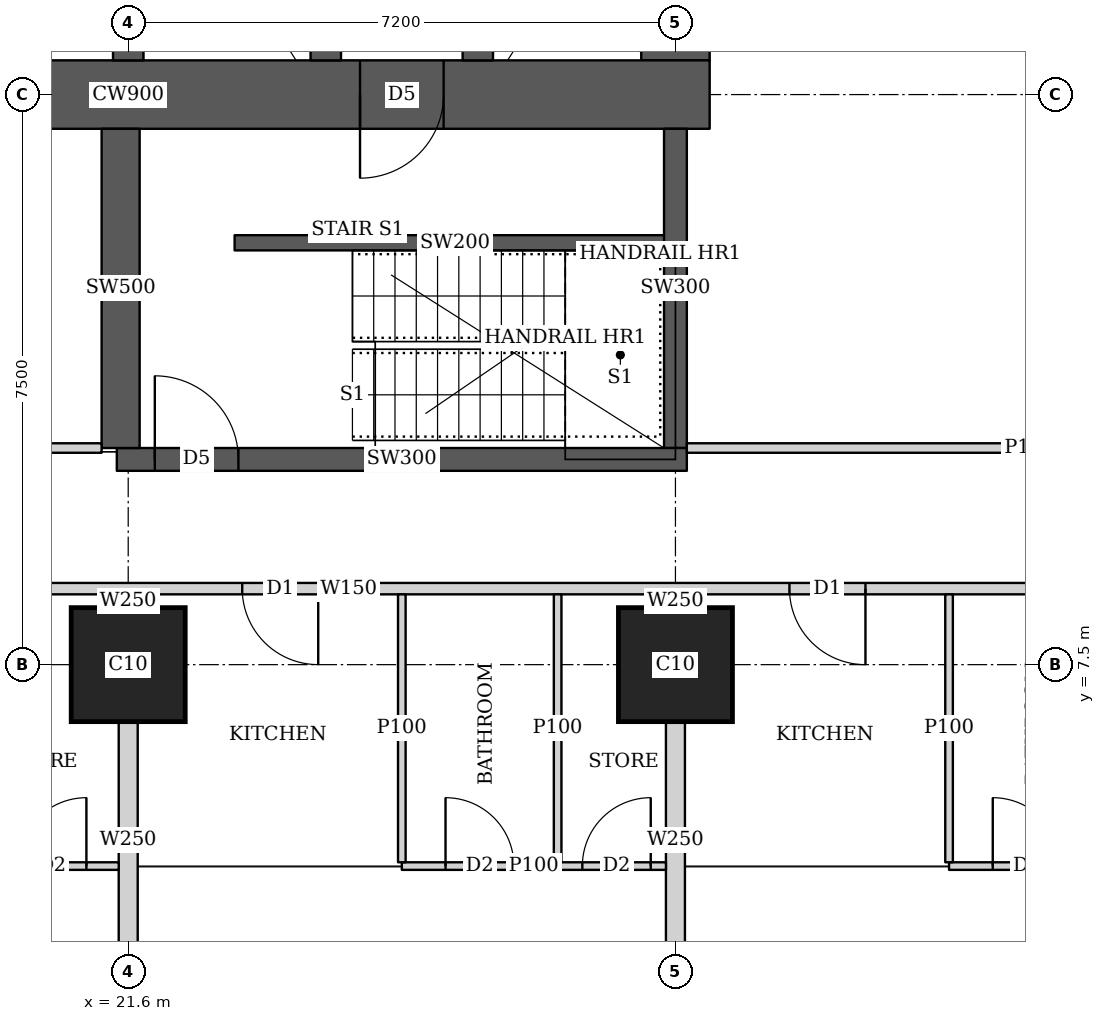
"""IFC4 building model, lengths in metres.
Left out: names, types, materials, properties, quantities, classifications, styles, units other than length and angle.
Written with IfcOpenShell. Run it as: python <this file> out.ifc"""

import sys

from ifc_helpers import new_model, si_unit, direction, frame, frame_2d, origin, origin_2d, place, context, subcontext, project, spatial, rectangle, extrude, element, fill, save


model = new_model("IFC4")
c1 = context("Model", 3, precision=1e-05, world=origin(), true_north=direction((0.0, 1.0)))
c2 = subcontext(c1, "Body", "Model", "MODEL_VIEW")
j1 = project(units=[si_unit("LENGTHUNIT", "METRE"), si_unit("PLANEANGLEUNIT", "RADIAN")], contexts=[c1])
p1 = place(None, origin())
s1 = spatial("IfcSite", under=j1, at=p1, CompositionType="ELEMENT")
p2 = place(p1, origin())
s2 = spatial("IfcBuilding", under=s1, at=p2, CompositionType="ELEMENT")
p3 = place(p2, frame((0.0, 0.0, 184.55)))
s3 = spatial("IfcBuildingStorey", under=s2, at=p3, CompositionType="ELEMENT", Elevation=184.55)
for number, where, z_axis, x_axis in (
    (1, (21.6, 7.5, 0.0), (0.0, 0.0, 1.0), (1.0, 0.0, 0.0)),
    (2, (28.8, 7.5, 0.0), (0.0, 0.0, 1.0), (1.0, 0.0, 0.0)),
):
    element("IfcColumn", number, at=place(p3, frame(where, z_axis=z_axis, x_axis=x_axis)), inside=s3, PredefinedType="COLUMN", context=c2, shape_type="SweptSolid", body=[
        extrude(rectangle(XDim=1.5, YDim=1.5, at=origin_2d()), origin(), (0.0, 0.0, 1.0), 3.75),
    ])
p4 = place(p3, frame((13.95, 15.0, 0.0), z_axis=(0.0, 0.0, 1.0), x_axis=(1.0, 0.0, 0.0)))
e3 = element("IfcWall", 3, at=p4, inside=s3, PredefinedType="SHEAR", context=c2, shape_type="SweptSolid", body=[
    extrude(rectangle(XDim=15.3, YDim=0.9, at=frame_2d((7.65, 0.0))), origin(), (0.0, 0.0, 1.0), 3.75),
])
p5 = place(p4, frame((4.45, 0.0, 0.0)))
e4 = element("IfcOpeningElement", 4, at=p5, cuts=e3, PredefinedType="OPENING", context=c2, shape_type="SweptSolid", body=[
    extrude(rectangle(XDim=1.8, YDim=2.1, at=frame_2d((0.9, 1.05))), frame((0.0, 0.46, 0.0), z_axis=(0.0, -1.0, 0.0), x_axis=(1.0, 0.0, 0.0)), (0.0, 0.0, 1.0), 0.92),
])
p6 = place(p4, frame((10.7, 0.0, 0.0)))
e5 = element("IfcOpeningElement", 5, at=p6, cuts=e3, PredefinedType="OPENING", context=c2, shape_type="SweptSolid", body=[
    extrude(rectangle(XDim=1.1, YDim=2.1, at=frame_2d((0.55, 1.05))), frame((0.0, 0.46, 0.0), z_axis=(0.0, -1.0, 0.0), x_axis=(1.0, 0.0, 0.0)), (0.0, 0.0, 1.0), 0.92),
])
p7 = place(p3, frame((28.8, 15.45, 0.0), z_axis=(0.0, 0.0, 1.0), x_axis=(0.0, 1.0, 0.0)))
e6 = element("IfcWall", 6, at=p7, inside=s3, PredefinedType="SHEAR", context=c2, shape_type="SweptSolid", body=[
    extrude(rectangle(XDim=14.1, YDim=0.9, at=frame_2d((7.05, 0.0))), origin(), (0.0, 0.0, 1.0), 3.75),
])
p8 = place(p3, frame((21.6, 15.45, 0.0), z_axis=(0.0, 0.0, 1.0), x_axis=(0.0, 1.0, 0.0)))
e7 = element("IfcWall", 7, at=p8, inside=s3, PredefinedType="SHEAR", context=c2, shape_type="SweptSolid", body=[
    extrude(rectangle(XDim=14.1, YDim=0.4, at=frame_2d((7.05, 0.0))), origin(), (0.0, 0.0, 1.0), 3.75),
])
p9 = place(p8, frame((0.875, 0.0, 0.0)))
e8 = element("IfcOpeningElement", 8, at=p9, cuts=e7, PredefinedType="OPENING", context=c2, shape_type="SweptSolid", body=[
    extrude(rectangle(XDim=1.1, YDim=2.1, at=frame_2d((0.55, 1.05))), frame((0.0, 0.21, 0.0), z_axis=(0.0, -1.0, 0.0), x_axis=(1.0, 0.0, 0.0)), (0.0, 0.0, 1.0), 0.42),
])
p10 = place(p8, frame((4.625, 0.0, 0.0)))
e9 = element("IfcOpeningElement", 9, at=p10, cuts=e7, PredefinedType="OPENING", context=c2, shape_type="SweptSolid", body=[
    extrude(rectangle(XDim=1.1, YDim=2.1, at=frame_2d((0.55, 1.05))), frame((0.0, 0.21, 0.0), z_axis=(0.0, -1.0, 0.0), x_axis=(1.0, 0.0, 0.0)), (0.0, 0.0, 1.0), 0.42),
])
p11 = place(p8, frame((8.375, 0.0, 0.0)))
e10 = element("IfcOpeningElement", 10, at=p11, cuts=e7, PredefinedType="OPENING", context=c2, shape_type="SweptSolid", body=[
    extrude(rectangle(XDim=1.1, YDim=2.1, at=frame_2d((0.55, 1.05))), frame((0.0, 0.21, 0.0), z_axis=(0.0, -1.0, 0.0), x_axis=(1.0, 0.0, 0.0)), (0.0, 0.0, 1.0), 0.42),
])
p12 = place(p8, frame((12.125, 0.0, 0.0)))
e11 = element("IfcOpeningElement", 11, at=p12, cuts=e7, PredefinedType="OPENING", context=c2, shape_type="SweptSolid", body=[
    extrude(rectangle(XDim=1.1, YDim=2.1, at=frame_2d((0.55, 1.05))), frame((0.0, 0.21, 0.0), z_axis=(0.0, -1.0, 0.0), x_axis=(1.0, 0.0, 0.0)), (0.0, 0.0, 1.0), 0.42),
])
p13 = place(p3, frame((24.2, 15.45, 0.0), z_axis=(0.0, 0.0, 1.0), x_axis=(0.0, 1.0, 0.0)))
e12 = element("IfcWall", 12, at=p13, inside=s3, PredefinedType="SHEAR", context=c2, shape_type="SweptSolid", body=[
    extrude(rectangle(XDim=14.1, YDim=0.4, at=frame_2d((7.05, 0.0))), origin(), (0.0, 0.0, 1.0), 3.75),
])
p14 = place(p3, frame((26.2, 15.45, 0.0), z_axis=(0.0, 0.0, 1.0), x_axis=(0.0, 1.0, 0.0)))
e13 = element("IfcWall", 13, at=p14, inside=s3, PredefinedType="SHEAR", context=c2, shape_type="SweptSolid", body=[
    extrude(rectangle(XDim=3.1, YDim=0.4, at=frame_2d((1.55, 0.0))), origin(), (0.0, 0.0, 1.0), 3.75),
])
p15 = place(p14, frame((0.825, 0.0, 0.0)))
e14 = element("IfcOpeningElement", 14, at=p15, cuts=e13, PredefinedType="OPENING", context=c2, shape_type="SweptSolid", body=[
    extrude(rectangle(XDim=1.2, YDim=2.1, at=frame_2d((0.6, 1.05))), frame((0.0, 0.21, 0.0), z_axis=(0.0, -1.0, 0.0), x_axis=(1.0, 0.0, 0.0)), (0.0, 0.0, 1.0), 0.42),
])
p16 = place(p3, frame((21.45, 10.2, 0.0), z_axis=(0.0, 0.0, 1.0), x_axis=(1.0, 0.0, 0.0)))
e15 = element("IfcWall", 15, at=p16, inside=s3, PredefinedType="SHEAR", context=c2, shape_type="SweptSolid", body=[
    extrude(rectangle(XDim=7.5, YDim=0.3, at=frame_2d((3.75, 0.0))), origin(), (0.0, 0.0, 1.0), 3.75),
])
p17 = place(p16, frame((0.5, 0.0, 0.0)))
e16 = element("IfcOpeningElement", 16, at=p17, cuts=e15, PredefinedType="OPENING", context=c2, shape_type="SweptSolid", body=[
    extrude(rectangle(XDim=1.1, YDim=2.1, at=frame_2d((0.55, 1.05))), frame((0.0, 0.16, 0.0), z_axis=(0.0, -1.0, 0.0), x_axis=(1.0, 0.0, 0.0)), (0.0, 0.0, 1.0), 0.32),
])
p18 = place(p3, frame((21.5, 10.35, 0.0), z_axis=(0.0, 0.0, 1.0), x_axis=(0.0, 1.0, 0.0)))
e17 = element("IfcWall", 17, at=p18, inside=s3, PredefinedType="SHEAR", context=c2, shape_type="SweptSolid", body=[
    extrude(rectangle(XDim=4.2, YDim=0.5, at=frame_2d((2.1, 0.0))), origin(), (0.0, 0.0, 1.0), 3.75),
])
p19 = place(p3, frame((28.8, 10.35, 0.0), z_axis=(0.0, 0.0, 1.0), x_axis=(0.0, 1.0, 0.0)))
e18 = element("IfcWall", 18, at=p19, inside=s3, PredefinedType="SHEAR", context=c2, shape_type="SweptSolid", body=[
    extrude(rectangle(XDim=4.2, YDim=0.3, at=frame_2d((2.1, 0.0))), origin(), (0.0, 0.0, 1.0), 3.75),
])
p20 = place(p3, frame((40.053, 8.5, 0.0), z_axis=(0.0, 0.0, 1.0), x_axis=(-1.0, 0.0, 0.0)))
e19 = element("IfcWall", 19, at=p20, inside=s3, PredefinedType="SOLIDWALL", context=c2, shape_type="SweptSolid", body=[
    extrude(rectangle(XDim=31.703, YDim=0.15, at=frame_2d((15.852, 0.0))), origin(), (0.0, 0.0, 1.0), 3.45),
])
p21 = place(p20, frame((28.103, 0.0, 0.0)))
e20 = element("IfcOpeningElement", 20, at=p21, cuts=e19, PredefinedType="OPENING", context=c2, shape_type="SweptSolid", body=[
    extrude(rectangle(XDim=1.0, YDim=2.1, at=frame_2d((0.5, 1.05))), frame((0.0, 0.085, 0.0), z_axis=(0.0, -1.0, 0.0), x_axis=(1.0, 0.0, 0.0)), (0.0, 0.0, 1.0), 0.17),
])
p22 = place(p20, frame((15.953, 0.0, 0.0)))
e21 = element("IfcOpeningElement", 21, at=p22, cuts=e19, PredefinedType="OPENING", context=c2, shape_type="SweptSolid", body=[
    extrude(rectangle(XDim=1.0, YDim=2.1, at=frame_2d((0.5, 1.05))), frame((0.0, 0.085, 0.0), z_axis=(0.0, -1.0, 0.0), x_axis=(1.0, 0.0, 0.0)), (0.0, 0.0, 1.0), 0.17),
])
p23 = place(p20, frame((8.753, 0.0, 0.0)))
e22 = element("IfcOpeningElement", 22, at=p23, cuts=e19, PredefinedType="OPENING", context=c2, shape_type="SweptSolid", body=[
    extrude(rectangle(XDim=1.0, YDim=2.1, at=frame_2d((0.5, 1.05))), frame((0.0, 0.085, 0.0), z_axis=(0.0, -1.0, 0.0), x_axis=(1.0, 0.0, 0.0)), (0.0, 0.0, 1.0), 0.17),
])
p24 = place(p3, frame((21.475, 4.85, 0.0), z_axis=(0.0, 0.0, 1.0), x_axis=(-1.0, 0.0, 0.0)))
e23 = element("IfcWall", 23, at=p24, inside=s3, PredefinedType="PARTITIONING", context=c2, shape_type="SweptSolid", body=[
    extrude(rectangle(XDim=7.075, YDim=0.1, at=frame_2d((3.538, 0.0))), origin(), (0.0, 0.0, 1.0), 3.45),
])
p25 = place(p24, frame((5.6, 0.0, 0.0)))
e24 = element("IfcOpeningElement", 24, at=p25, cuts=e23, PredefinedType="OPENING", context=c2, shape_type="SweptSolid", body=[
    extrude(rectangle(XDim=0.9, YDim=2.1, at=frame_2d((0.45, 1.05))), frame((0.0, 0.06, 0.0), z_axis=(0.0, -1.0, 0.0), x_axis=(1.0, 0.0, 0.0)), (0.0, 0.0, 1.0), 0.12),
])
p26 = place(p24, frame((2.225, 0.0, 0.0)))
e25 = element("IfcOpeningElement", 25, at=p26, cuts=e23, PredefinedType="OPENING", context=c2, shape_type="SweptSolid", body=[
    extrude(rectangle(XDim=0.9, YDim=2.1, at=frame_2d((0.45, 1.05))), frame((0.0, 0.06, 0.0), z_axis=(0.0, -1.0, 0.0), x_axis=(1.0, 0.0, 0.0)), (0.0, 0.0, 1.0), 0.12),
])
p27 = place(p24, frame((3.8, 0.0, 0.0)))
e26 = element("IfcOpeningElement", 26, at=p27, cuts=e23, PredefinedType="OPENING", context=c2, shape_type="SweptSolid", body=[
    extrude(rectangle(XDim=0.9, YDim=2.1, at=frame_2d((0.45, 1.05))), frame((0.0, 0.06, 0.0), z_axis=(0.0, -1.0, 0.0), x_axis=(1.0, 0.0, 0.0)), (0.0, 0.0, 1.0), 0.12),
])
p28 = place(p24, frame((0.425, 0.0, 0.0)))
e27 = element("IfcOpeningElement", 27, at=p28, cuts=e23, PredefinedType="OPENING", context=c2, shape_type="SweptSolid", body=[
    extrude(rectangle(XDim=0.9, YDim=2.1, at=frame_2d((0.45, 1.05))), frame((0.0, 0.06, 0.0), z_axis=(0.0, -1.0, 0.0), x_axis=(1.0, 0.0, 0.0)), (0.0, 0.0, 1.0), 0.12),
])
p29 = place(p3, frame((28.675, 4.85, 0.0), z_axis=(0.0, 0.0, 1.0), x_axis=(-1.0, 0.0, 0.0)))
e28 = element("IfcWall", 28, at=p29, inside=s3, PredefinedType="PARTITIONING", context=c2, shape_type="SweptSolid", body=[
    extrude(rectangle(XDim=3.475, YDim=0.1, at=frame_2d((1.738, 0.0))), origin(), (0.0, 0.0, 1.0), 3.45),
])
p30 = place(p29, frame((2.0, 0.0, 0.0)))
e29 = element("IfcOpeningElement", 29, at=p30, cuts=e28, PredefinedType="OPENING", context=c2, shape_type="SweptSolid", body=[
    extrude(rectangle(XDim=0.9, YDim=2.1, at=frame_2d((0.45, 1.05))), frame((0.0, 0.06, 0.0), z_axis=(0.0, -1.0, 0.0), x_axis=(1.0, 0.0, 0.0)), (0.0, 0.0, 1.0), 0.12),
])
p31 = place(p29, frame((0.2, 0.0, 0.0)))
e30 = element("IfcOpeningElement", 30, at=p31, cuts=e28, PredefinedType="OPENING", context=c2, shape_type="SweptSolid", body=[
    extrude(rectangle(XDim=0.9, YDim=2.1, at=frame_2d((0.45, 1.05))), frame((0.0, 0.06, 0.0), z_axis=(0.0, -1.0, 0.0), x_axis=(1.0, 0.0, 0.0)), (0.0, 0.0, 1.0), 0.12),
])
for number, where, z_axis, x_axis in (
    (31, (25.2, 4.9, 0.0), (0.0, 0.0, 1.0), (0.0, 1.0, 0.0)),
    (32, (27.25, 4.9, 0.0), (0.0, 0.0, 1.0), (0.0, 1.0, 0.0)),
):
    element("IfcWall", number, at=place(p3, frame(where, z_axis=z_axis, x_axis=x_axis)), inside=s3, PredefinedType="PARTITIONING", context=c2, shape_type="SweptSolid", body=[
        extrude(rectangle(XDim=3.525, YDim=0.1, at=frame_2d((1.763, 0.0))), origin(), (0.0, 0.0, 1.0), 3.45),
    ])
p32 = place(p3, frame((21.6, 3.65, 0.0), z_axis=(0.0, 0.0, 1.0), x_axis=(0.0, 1.0, 0.0)))
e33 = element("IfcWall", 33, at=p32, inside=s3, PredefinedType="SOLIDWALL", context=c2, shape_type="SweptSolid", body=[
    extrude(rectangle(XDim=3.099, YDim=0.25, at=frame_2d((1.55, 0.0))), origin(), (0.0, 0.0, 1.0), 3.45),
])
p33 = place(p3, frame((21.6, 8.251, 0.0), z_axis=(0.0, 0.0, 1.0), x_axis=(0.0, 1.0, 0.0)))
e34 = element("IfcWall", 34, at=p33, inside=s3, PredefinedType="SOLIDWALL", context=c2, shape_type="SweptSolid", body=[
    extrude(rectangle(XDim=0.174, YDim=0.25, at=frame_2d((0.087, 0.0))), origin(), (0.0, 0.0, 1.0), 3.45),
])
p34 = place(p3, frame((40.747, 4.85, 0.0), z_axis=(0.0, 0.0, 1.0), x_axis=(-1.0, 0.0, 0.0)))
e35 = element("IfcWall", 35, at=p34, inside=s3, PredefinedType="PARTITIONING", context=c2, shape_type="SweptSolid", body=[
    extrude(rectangle(XDim=8.347, YDim=0.1, at=frame_2d((4.174, 0.0))), origin(), (0.0, 0.0, 1.0), 3.45),
])
p35 = place(p34, frame((6.872, 0.0, 0.0)))
e36 = element("IfcOpeningElement", 36, at=p35, cuts=e35, PredefinedType="OPENING", context=c2, shape_type="SweptSolid", body=[
    extrude(rectangle(XDim=0.9, YDim=2.1, at=frame_2d((0.45, 1.05))), frame((0.0, 0.06, 0.0), z_axis=(0.0, -1.0, 0.0), x_axis=(1.0, 0.0, 0.0)), (0.0, 0.0, 1.0), 0.12),
])
p36 = place(p34, frame((3.497, 0.0, 0.0)))
e37 = element("IfcOpeningElement", 37, at=p36, cuts=e35, PredefinedType="OPENING", context=c2, shape_type="SweptSolid", body=[
    extrude(rectangle(XDim=0.9, YDim=2.1, at=frame_2d((0.45, 1.05))), frame((0.0, 0.06, 0.0), z_axis=(0.0, -1.0, 0.0), x_axis=(1.0, 0.0, 0.0)), (0.0, 0.0, 1.0), 0.12),
])
p37 = place(p34, frame((0.15, 0.0, 0.0)))
e38 = element("IfcOpeningElement", 38, at=p37, cuts=e35, PredefinedType="OPENING", context=c2, shape_type="SweptSolid", body=[
    extrude(rectangle(XDim=0.9, YDim=2.1, at=frame_2d((0.45, 1.05))), frame((0.0, 0.06, 0.0), z_axis=(0.0, -1.0, 0.0), x_axis=(1.0, 0.0, 0.0)), (0.0, 0.0, 1.0), 0.12),
])
p38 = place(p34, frame((5.072, 0.0, 0.0)))
e39 = element("IfcOpeningElement", 39, at=p38, cuts=e35, PredefinedType="OPENING", context=c2, shape_type="SweptSolid", body=[
    extrude(rectangle(XDim=0.9, YDim=2.1, at=frame_2d((0.45, 1.05))), frame((0.0, 0.06, 0.0), z_axis=(0.0, -1.0, 0.0), x_axis=(1.0, 0.0, 0.0)), (0.0, 0.0, 1.0), 0.12),
])
p39 = place(p34, frame((1.697, 0.0, 0.0)))
e40 = element("IfcOpeningElement", 40, at=p39, cuts=e35, PredefinedType="OPENING", context=c2, shape_type="SweptSolid", body=[
    extrude(rectangle(XDim=0.9, YDim=2.1, at=frame_2d((0.45, 1.05))), frame((0.0, 0.06, 0.0), z_axis=(0.0, -1.0, 0.0), x_axis=(1.0, 0.0, 0.0)), (0.0, 0.0, 1.0), 0.12),
])
p40 = place(p3, frame((32.4, 4.9, 0.0), z_axis=(0.0, 0.0, 1.0), x_axis=(0.0, 1.0, 0.0)))
e41 = element("IfcWall", 41, at=p40, inside=s3, PredefinedType="PARTITIONING", context=c2, shape_type="SweptSolid", body=[
    extrude(rectangle(XDim=3.525, YDim=0.1, at=frame_2d((1.763, 0.0))), origin(), (0.0, 0.0, 1.0), 3.45),
])
p41 = place(p3, frame((28.8, 3.65, 0.0), z_axis=(0.0, 0.0, 1.0), x_axis=(0.0, 1.0, 0.0)))
e42 = element("IfcWall", 42, at=p41, inside=s3, PredefinedType="SOLIDWALL", context=c2, shape_type="SweptSolid", body=[
    extrude(rectangle(XDim=3.099, YDim=0.25, at=frame_2d((1.55, 0.0))), origin(), (0.0, 0.0, 1.0), 3.45),
])
p42 = place(p3, frame((28.8, 8.251, 0.0), z_axis=(0.0, 0.0, 1.0), x_axis=(0.0, 1.0, 0.0)))
e43 = element("IfcWall", 43, at=p42, inside=s3, PredefinedType="SOLIDWALL", context=c2, shape_type="SweptSolid", body=[
    extrude(rectangle(XDim=0.174, YDim=0.25, at=frame_2d((0.087, 0.0))), origin(), (0.0, 0.0, 1.0), 3.45),
])
p43 = place(p3, frame((10.413, 10.35, 0.0), z_axis=(0.0, 0.0, 1.0), x_axis=(1.0, 0.0, 0.0)))
e44 = element("IfcWall", 44, at=p43, inside=s3, PredefinedType="PARTITIONING", context=c2, shape_type="SweptSolid", body=[
    extrude(rectangle(XDim=10.837, YDim=0.125, at=frame_2d((5.418, 0.0))), origin(), (0.0, 0.0, 1.0), 3.45),
])
p44 = place(p43, frame((7.582, 0.0, 0.0)))
e45 = element("IfcOpeningElement", 45, at=p44, cuts=e44, PredefinedType="OPENING", context=c2, shape_type="SweptSolid", body=[
    extrude(rectangle(XDim=1.8, YDim=2.1, at=frame_2d((0.9, 1.05))), frame((0.0, 0.073, 0.0), z_axis=(0.0, -1.0, 0.0), x_axis=(1.0, 0.0, 0.0)), (0.0, 0.0, 1.0), 0.145),
])
p45 = place(p3, frame((28.95, 10.35, 0.0), z_axis=(0.0, 0.0, 1.0), x_axis=(1.0, 0.0, 0.0)))
e46 = element("IfcWall", 46, at=p45, inside=s3, PredefinedType="PARTITIONING", context=c2, shape_type="SweptSolid", body=[
    extrude(rectangle(XDim=9.013, YDim=0.125, at=frame_2d((4.506, 0.0))), origin(), (0.0, 0.0, 1.0), 3.45),
])
p46 = place(p3, frame((35.354, 10.424, 0.0), z_axis=(0.0, 0.0, 1.0), x_axis=(-0.185612234763, 0.982623070311, 0.0)))
e47 = element("IfcWall", 47, at=p46, inside=s3, PredefinedType="PARTITIONING", context=c2, shape_type="SweptSolid", body=[
    extrude(rectangle(XDim=11.513, YDim=0.125, at=frame_2d((5.756, 0.0))), origin(), (0.0, 0.0, 1.0), 3.45),
])
p47 = place(p46, frame((0.697, 0.0, 0.0)))
e48 = element("IfcOpeningElement", 48, at=p47, cuts=e47, PredefinedType="OPENING", context=c2, shape_type="SweptSolid", body=[
    extrude(rectangle(XDim=1.0, YDim=2.1, at=frame_2d((0.5, 1.05))), frame((0.0, 0.073, 0.0), z_axis=(0.0, -1.0, 0.0), x_axis=(1.0, 0.0, 0.0)), (0.0, 0.0, 1.0), 0.145),
])
p48 = place(p3, frame((23.0, 13.05, 0.0), z_axis=(0.0, 0.0, 1.0), x_axis=(1.0, 0.0, 0.0)))
e49 = element("IfcWall", 49, at=p48, inside=s3, PredefinedType="SHEAR", context=c2, shape_type="SweptSolid", body=[
    extrude(rectangle(XDim=5.8, YDim=0.2, at=frame_2d((2.9, 0.0))), origin(), (0.0, 0.0, 1.0), 3.75),
])
p49 = place(p28, origin())
e50 = element("IfcDoor", 50, at=p49, inside=s3, OperationType="SINGLE_SWING_RIGHT", PredefinedType="DOOR", context=c2, shape_type="SweptSolid", body=[
    extrude(rectangle(XDim=0.9, YDim=2.1, at=frame_2d((0.45, 1.05))), frame((0.0, 0.025, 0.0), z_axis=(0.0, -1.0, 0.0), x_axis=(1.0, 0.0, 0.0)), (0.0, 0.0, 1.0), 0.05),
])
fill(e27, e50)
p50 = place(p30, origin())
e51 = element("IfcDoor", 51, at=p50, inside=s3, OperationType="SINGLE_SWING_LEFT", PredefinedType="DOOR", context=c2, shape_type="SweptSolid", body=[
    extrude(rectangle(XDim=0.9, YDim=2.1, at=frame_2d((0.45, 1.05))), frame((0.0, 0.025, 0.0), z_axis=(0.0, -1.0, 0.0), x_axis=(1.0, 0.0, 0.0)), (0.0, 0.0, 1.0), 0.05),
])
fill(e29, e51)
p51 = place(p31, origin())
e52 = element("IfcDoor", 52, at=p51, inside=s3, OperationType="SINGLE_SWING_RIGHT", PredefinedType="DOOR", context=c2, shape_type="SweptSolid", body=[
    extrude(rectangle(XDim=0.9, YDim=2.1, at=frame_2d((0.45, 1.05))), frame((0.0, 0.025, 0.0), z_axis=(0.0, -1.0, 0.0), x_axis=(1.0, 0.0, 0.0)), (0.0, 0.0, 1.0), 0.05),
])
fill(e30, e52)
p52 = place(p22, origin())
e53 = element("IfcDoor", 53, at=p52, inside=s3, OperationType="SINGLE_SWING_LEFT", PredefinedType="DOOR", context=c2, shape_type="SweptSolid", body=[
    extrude(rectangle(XDim=1.0, YDim=2.1, at=frame_2d((0.5, 1.05))), frame((0.0, 0.025, 0.0), z_axis=(0.0, -1.0, 0.0), x_axis=(1.0, 0.0, 0.0)), (0.0, 0.0, 1.0), 0.05),
])
fill(e21, e53)
p53 = place(p35, origin())
e54 = element("IfcDoor", 54, at=p53, inside=s3, OperationType="SINGLE_SWING_LEFT", PredefinedType="DOOR", context=c2, shape_type="SweptSolid", body=[
    extrude(rectangle(XDim=0.9, YDim=2.1, at=frame_2d((0.45, 1.05))), frame((0.0, 0.025, 0.0), z_axis=(0.0, -1.0, 0.0), x_axis=(1.0, 0.0, 0.0)), (0.0, 0.0, 1.0), 0.05),
])
fill(e36, e54)
p54 = place(p23, origin())
e55 = element("IfcDoor", 55, at=p54, inside=s3, OperationType="SINGLE_SWING_LEFT", PredefinedType="DOOR", context=c2, shape_type="SweptSolid", body=[
    extrude(rectangle(XDim=1.0, YDim=2.1, at=frame_2d((0.5, 1.05))), frame((0.0, 0.025, 0.0), z_axis=(0.0, -1.0, 0.0), x_axis=(1.0, 0.0, 0.0)), (0.0, 0.0, 1.0), 0.05),
])
fill(e22, e55)
p55 = place(p6, origin())
e56 = element("IfcDoor", 56, at=p55, inside=s3, OperationType="SINGLE_SWING_RIGHT", PredefinedType="DOOR", context=c2, shape_type="SweptSolid", body=[
    extrude(rectangle(XDim=1.1, YDim=2.1, at=frame_2d((0.55, 1.05))), frame((0.0, 0.025, 0.0), z_axis=(0.0, -1.0, 0.0), x_axis=(1.0, 0.0, 0.0)), (0.0, 0.0, 1.0), 0.05),
])
fill(e5, e56)
p56 = place(p17, origin())
e57 = element("IfcDoor", 57, at=p56, inside=s3, OperationType="SINGLE_SWING_LEFT", PredefinedType="DOOR", context=c2, shape_type="SweptSolid", body=[
    extrude(rectangle(XDim=1.1, YDim=2.1, at=frame_2d((0.55, 1.05))), frame((0.0, 0.025, 0.0), z_axis=(0.0, -1.0, 0.0), x_axis=(1.0, 0.0, 0.0)), (0.0, 0.0, 1.0), 0.05),
])
fill(e16, e57)
save(model, sys.argv[1])
